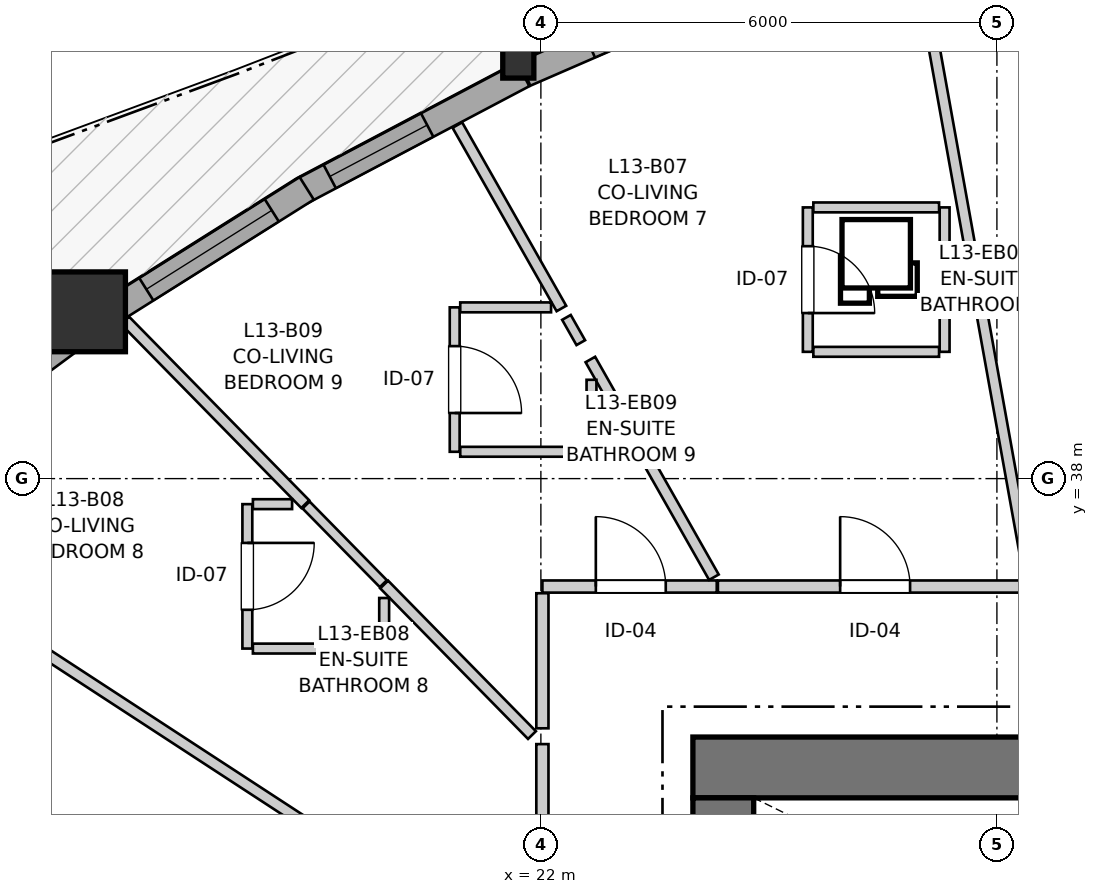
"""IFC4 building model, lengths in metres.
Left out: names, types, materials, properties, quantities, classifications, styles, units other than length and angle.
Written with IfcOpenShell. Run it as: python <this file> out.ifc"""

import sys

from ifc_helpers import new_model, si_unit, direction, frame, frame_2d, origin, origin_2d, place, context, subcontext, project, spatial, rectangle, i_section, extrude, source, transform, mapped, element, fill, save


model = new_model("IFC4")
c1 = context("Model", 3, precision=1e-05, world=origin(), true_north=direction((0.0, 1.0)))
c2 = subcontext(c1, "Body", "Model", "MODEL_VIEW")
j1 = project(units=[si_unit("LENGTHUNIT", "METRE"), si_unit("PLANEANGLEUNIT", "RADIAN")], contexts=[c1])
p1 = place(None, origin())
s1 = spatial("IfcSite", under=j1, at=p1, CompositionType="ELEMENT")
p2 = place(p1, origin())
s2 = spatial("IfcBuilding", under=s1, at=p2, CompositionType="ELEMENT")
p3 = place(p2, frame((0.0, 0.0, 46.2)))
s3 = spatial("IfcBuildingStorey", under=s2, at=p3, CompositionType="ELEMENT", Elevation=46.2)
p4 = place(p3, frame((36.7, 34.2, 0.0), z_axis=(0.0, 0.0, 1.0), x_axis=(-1.0, 0.0, 0.0)))
e1 = element("IfcWall", 1, at=p4, inside=s3, PredefinedType="SHEAR", context=c2, shape_type="SweptSolid", body=[
    extrude(rectangle(XDim=12.7, YDim=0.8, at=frame_2d((6.35, 0.0))), origin(), (0.0, 0.0, 1.0), 2.94),
])
p5 = place(p3, frame((24.4, 33.8, 0.0), z_axis=(0.0, 0.0, 1.0), x_axis=(0.0, -1.0, 0.0)))
e2 = element("IfcWall", 2, at=p5, inside=s3, PredefinedType="SHEAR", context=c2, shape_type="SweptSolid", body=[
    extrude(rectangle(XDim=15.6, YDim=0.8, at=frame_2d((7.8, 0.0))), origin(), (0.0, 0.0, 1.0), 2.94),
])
p6 = place(p5, frame((7.05, 0.0, 0.0)))
e3 = element("IfcOpeningElement", 3, at=p6, cuts=e2, PredefinedType="OPENING", context=c2, shape_type="SweptSolid", body=[
    extrude(rectangle(XDim=1.5, YDim=2.15, at=frame_2d((0.75, 1.075))), frame((0.0, 0.41, 0.0), z_axis=(0.0, -1.0, 0.0), x_axis=(1.0, 0.0, 0.0)), (0.0, 0.0, 1.0), 0.82),
])
p7 = place(p5, frame((3.52, 0.0, 0.0)))
e4 = element("IfcOpeningElement", 4, at=p7, cuts=e2, PredefinedType="OPENING", context=c2, shape_type="SweptSolid", body=[
    extrude(rectangle(XDim=0.86, YDim=2.05, at=frame_2d((0.43, 1.025))), frame((0.0, 0.41, 0.0), z_axis=(0.0, -1.0, 0.0), x_axis=(1.0, 0.0, 0.0)), (0.0, 0.0, 1.0), 0.82),
])
p8 = place(p5, frame((11.22, 0.0, 0.0)))
e5 = element("IfcOpeningElement", 5, at=p8, cuts=e2, PredefinedType="OPENING", context=c2, shape_type="SweptSolid", body=[
    extrude(rectangle(XDim=0.86, YDim=2.05, at=frame_2d((0.43, 1.025))), frame((0.0, 0.41, 0.0), z_axis=(0.0, -1.0, 0.0), x_axis=(1.0, 0.0, 0.0)), (0.0, 0.0, 1.0), 0.82),
])
m1 = source(origin(), c2, "Body", "SweptSolid", [
    extrude(i_section(OverallWidth=0.409, OverallDepth=0.425, WebThickness=0.03, FlangeThickness=0.048, FilletRadius=0.015, at=origin_2d()), origin(), (0.0, 0.0, 1.0), 2.94),
])
p9 = place(p3, frame((21.703, 43.482, 0.0), z_axis=(0.0, 0.0, 1.0), x_axis=(1.0, 0.0, 0.0)))
e6 = element("IfcColumn", 6, at=p9, inside=s3, PredefinedType="PILASTER", context=c2, shape_type="MappedRepresentation", body=[
    mapped(m1, transform((0.0, 0.0, 0.0), x_axis=(1.0, 0.0, 0.0), y_axis=(0.0, 1.0, 0.0), z_axis=(0.0, 0.0, 1.0), scale=1.0)),
])
m2 = source(origin(), c2, "Body", "SweptSolid", [
    extrude(rectangle(XDim=1.05, YDim=1.05, at=origin_2d()), origin(), (0.0, 0.0, 1.0), 2.94),
])
p10 = place(p3, frame((16.009, 40.194, 0.0), z_axis=(0.0, 0.0, 1.0), x_axis=(1.0, 0.0, 0.0)))
e7 = element("IfcColumn", 7, at=p10, inside=s3, PredefinedType="COLUMN", context=c2, shape_type="MappedRepresentation", body=[
    mapped(m2, transform((0.0, 0.0, 0.0), x_axis=(1.0, 0.0, 0.0), y_axis=(0.0, 1.0, 0.0), z_axis=(0.0, 0.0, 1.0), scale=1.0)),
])
p11 = place(p3, frame((24.842, 44.656, 0.0), z_axis=(0.0, 0.0, 1.0), x_axis=(-0.917071223009, -0.398723427866, 0.0)))
e8 = element("IfcWall", 8, at=p11, inside=s3, PredefinedType="SOLIDWALL", context=c2, shape_type="SweptSolid", body=[
    extrude(rectangle(XDim=3.327, YDim=0.35, at=frame_2d((1.663, 0.0))), origin(), (0.0, 0.0, 1.0), 2.42),
])
p12 = place(p11, frame((0.948, 0.0, 0.82)))
e9 = element("IfcOpeningElement", 9, at=p12, cuts=e8, PredefinedType="OPENING", context=c2, shape_type="SweptSolid", body=[
    extrude(rectangle(XDim=1.45, YDim=1.25, at=frame_2d((0.725, 0.625))), frame((0.0, 0.185, 0.0), z_axis=(0.0, -1.0, 0.0), x_axis=(1.0, 0.0, 0.0)), (0.0, 0.0, 1.0), 0.37),
])
p13 = place(p3, frame((21.767, 43.318, 0.0), z_axis=(0.0, 0.0, 1.0), x_axis=(-0.884379674805, -0.466768240984, 0.0)))
e10 = element("IfcWall", 10, at=p13, inside=s3, PredefinedType="SOLIDWALL", context=c2, shape_type="SweptSolid", body=[
    extrude(rectangle(XDim=3.308, YDim=0.35, at=frame_2d((1.654, 0.0))), origin(), (0.0, 0.0, 1.0), 2.42),
])
p14 = place(p13, frame((1.428, 0.0, 0.82)))
e11 = element("IfcOpeningElement", 11, at=p14, cuts=e10, PredefinedType="OPENING", context=c2, shape_type="SweptSolid", body=[
    extrude(rectangle(XDim=1.45, YDim=1.25, at=frame_2d((0.725, 0.625))), frame((0.0, 0.185, 0.0), z_axis=(0.0, -1.0, 0.0), x_axis=(1.0, 0.0, 0.0)), (0.0, 0.0, 1.0), 0.37),
])
p15 = place(p3, frame((18.919, 41.818, 0.0), z_axis=(0.0, 0.0, 1.0), x_axis=(-0.846409172462, -0.532533109555, 0.0)))
e12 = element("IfcWall", 12, at=p15, inside=s3, PredefinedType="SOLIDWALL", context=c2, shape_type="SweptSolid", body=[
    extrude(rectangle(XDim=3.028, YDim=0.35, at=frame_2d((1.514, 0.0))), origin(), (0.0, 0.0, 1.0), 2.42),
])
p16 = place(p15, frame((0.543, 0.0, 0.82)))
e13 = element("IfcOpeningElement", 13, at=p16, cuts=e12, PredefinedType="OPENING", context=c2, shape_type="SweptSolid", body=[
    extrude(rectangle(XDim=1.95, YDim=1.4, at=frame_2d((0.975, 0.7))), frame((0.0, 0.185, 0.0), z_axis=(0.0, -1.0, 0.0), x_axis=(1.0, 0.0, 0.0)), (0.0, 0.0, 1.0), 0.37),
])
p17 = place(p3, frame((15.872, 39.875, 0.0), z_axis=(0.0, 0.0, 1.0), x_axis=(-0.803801282622, -0.594897888763, 0.0)))
e14 = element("IfcWall", 14, at=p17, inside=s3, PredefinedType="SOLIDWALL", context=c2, shape_type="SweptSolid", body=[
    extrude(rectangle(XDim=3.047, YDim=0.35, at=frame_2d((1.523, 0.0))), origin(), (0.0, 0.0, 1.0), 2.42),
])
p18 = place(p17, frame((0.719, 0.0, 0.82)))
e15 = element("IfcOpeningElement", 15, at=p18, cuts=e14, PredefinedType="OPENING", context=c2, shape_type="SweptSolid", body=[
    extrude(rectangle(XDim=1.6, YDim=1.35, at=frame_2d((0.8, 0.675))), frame((0.0, 0.185, 0.0), z_axis=(0.0, -1.0, 0.0), x_axis=(1.0, 0.0, 0.0)), (0.0, 0.0, 1.0), 0.37),
])
p19 = place(p3, frame((24.329, 36.58, 0.0), z_axis=(0.0, 0.0, 1.0), x_axis=(1.0, 0.0, 0.0)))
e16 = element("IfcWall", 16, at=p19, inside=s3, PredefinedType="PARTITIONING", context=c2, shape_type="SweptSolid", body=[
    extrude(rectangle(XDim=4.089, YDim=0.16, at=frame_2d((2.044, 0.0))), origin(), (0.0, 0.0, 1.0), 2.548),
])
p20 = place(p19, frame((1.608, 0.0, 0.0)))
e17 = element("IfcOpeningElement", 17, at=p20, cuts=e16, PredefinedType="OPENING", context=c2, shape_type="SweptSolid", body=[
    extrude(rectangle(XDim=0.92, YDim=2.1, at=frame_2d((0.46, 1.05))), frame((0.0, 0.09, 0.0), z_axis=(0.0, -1.0, 0.0), x_axis=(1.0, 0.0, 0.0)), (0.0, 0.0, 1.0), 0.18),
])
p21 = place(p3, frame((22.02, 31.467, 0.0), z_axis=(0.0, 0.0, 1.0), x_axis=(0.0, 1.0, 0.0)))
e18 = element("IfcWall", 18, at=p21, inside=s3, PredefinedType="PARTITIONING", context=c2, shape_type="SweptSolid", body=[
    extrude(rectangle(XDim=3.04, YDim=0.16, at=frame_2d((1.52, 0.0))), origin(), (0.0, 0.0, 1.0), 2.94),
])
p22 = place(p21, frame((1.033, 0.0, 0.0)))
e19 = element("IfcOpeningElement", 19, at=p22, cuts=e18, PredefinedType="OPENING", context=c2, shape_type="SweptSolid", body=[
    extrude(rectangle(XDim=0.92, YDim=2.1, at=frame_2d((0.46, 1.05))), frame((0.0, 0.09, 0.0), z_axis=(0.0, -1.0, 0.0), x_axis=(1.0, 0.0, 0.0)), (0.0, 0.0, 1.0), 0.18),
])
p23 = place(p3, frame((22.02, 36.58, 0.0), z_axis=(0.0, 0.0, 1.0), x_axis=(1.0, 0.0, 0.0)))
e20 = element("IfcWall", 20, at=p23, inside=s3, PredefinedType="PARTITIONING", context=c2, shape_type="SweptSolid", body=[
    extrude(rectangle(XDim=2.294, YDim=0.16, at=frame_2d((1.147, 0.0))), origin(), (0.0, 0.0, 1.0), 2.548),
])
p24 = place(p23, frame((0.703, 0.0, 0.0)))
e21 = element("IfcOpeningElement", 21, at=p24, cuts=e20, PredefinedType="OPENING", context=c2, shape_type="SweptSolid", body=[
    extrude(rectangle(XDim=0.92, YDim=2.1, at=frame_2d((0.46, 1.05))), frame((0.0, 0.09, 0.0), z_axis=(0.0, -1.0, 0.0), x_axis=(1.0, 0.0, 0.0)), (0.0, 0.0, 1.0), 0.18),
])
p25 = place(p3, frame((25.512, 41.568, 0.0), z_axis=(0.0, 0.0, 1.0), x_axis=(0.0, -1.0, 0.0)))
e22 = element("IfcWall", 22, at=p25, inside=s3, PredefinedType="PARTITIONING", context=c2, shape_type="SweptSolid", body=[
    extrude(rectangle(XDim=1.9, YDim=0.13, at=frame_2d((0.95, 0.0))), origin(), (0.0, 0.0, 1.0), 2.94),
])
p26 = place(p25, frame((0.51, 0.0, 0.0)))
e23 = element("IfcOpeningElement", 23, at=p26, cuts=e22, PredefinedType="OPENING", context=c2, shape_type="SweptSolid", body=[
    extrude(rectangle(XDim=0.88, YDim=2.05, at=frame_2d((0.44, 1.025))), frame((0.0, 0.075, 0.0), z_axis=(0.0, -1.0, 0.0), x_axis=(1.0, 0.0, 0.0)), (0.0, 0.0, 1.0), 0.15),
])
p27 = place(p3, frame((18.138, 37.664, 0.0), z_axis=(0.0, 0.0, 1.0), x_axis=(0.0, -1.0, 0.0)))
e24 = element("IfcWall", 24, at=p27, inside=s3, PredefinedType="PARTITIONING", context=c2, shape_type="SweptSolid", body=[
    extrude(rectangle(XDim=1.9, YDim=0.13, at=frame_2d((0.95, 0.0))), origin(), (0.0, 0.0, 1.0), 2.94),
])
p28 = place(p27, frame((0.51, 0.0, 0.0)))
e25 = element("IfcOpeningElement", 25, at=p28, cuts=e24, PredefinedType="OPENING", context=c2, shape_type="SweptSolid", body=[
    extrude(rectangle(XDim=0.88, YDim=2.05, at=frame_2d((0.44, 1.025))), frame((0.0, 0.075, 0.0), z_axis=(0.0, -1.0, 0.0), x_axis=(1.0, 0.0, 0.0)), (0.0, 0.0, 1.0), 0.15),
])
p29 = place(p3, frame((20.866, 40.253, 0.0), z_axis=(0.0, 0.0, 1.0), x_axis=(0.0, -1.0, 0.0)))
e26 = element("IfcWall", 26, at=p29, inside=s3, PredefinedType="PARTITIONING", context=c2, shape_type="SweptSolid", body=[
    extrude(rectangle(XDim=1.9, YDim=0.13, at=frame_2d((0.95, 0.0))), origin(), (0.0, 0.0, 1.0), 2.94),
])
p30 = place(p29, frame((0.51, 0.0, 0.0)))
e27 = element("IfcOpeningElement", 27, at=p30, cuts=e26, PredefinedType="OPENING", context=c2, shape_type="SweptSolid", body=[
    extrude(rectangle(XDim=0.88, YDim=2.05, at=frame_2d((0.44, 1.025))), frame((0.0, 0.075, 0.0), z_axis=(0.0, -1.0, 0.0), x_axis=(1.0, 0.0, 0.0)), (0.0, 0.0, 1.0), 0.15),
])
p31 = place(p3, frame((12.929, 37.365, 0.0), z_axis=(0.0, 0.0, 1.0), x_axis=(0.83754252852, -0.54637213776, 0.0)))
e28 = element("IfcWall", 28, at=p31, inside=s3, PredefinedType="PARTITIONING", context=c2, shape_type="SweptSolid", body=[
    extrude(rectangle(XDim=10.704, YDim=0.145, at=frame_2d((5.352, 0.0))), origin(), (0.0, 0.0, 1.0), 2.94),
])
p32 = place(p3, frame((26.905, 45.167, 0.0), z_axis=(0.0, 0.0, 1.0), x_axis=(0.176948932403, -0.984220033997, 0.0)))
e29 = element("IfcWall", 29, at=p32, inside=s3, PredefinedType="PARTITIONING", context=c2, shape_type="SweptSolid", body=[
    extrude(rectangle(XDim=8.622, YDim=0.145, at=frame_2d((4.311, 0.0))), origin(), (0.0, 0.0, 1.0), 2.94),
])
p33 = place(p3, frame((22.651, 39.567, 0.0), z_axis=(0.0, 0.0, 1.0), x_axis=(0.493566118786, -0.8697082766, 0.0)))
e30 = element("IfcWall", 30, at=p33, inside=s3, PredefinedType="PARTITIONING", context=c2, shape_type="SweptSolid", body=[
    extrude(rectangle(XDim=3.293, YDim=0.145, at=frame_2d((1.647, 0.0))), origin(), (0.0, 0.0, 1.0), 2.94),
])
p34 = place(p3, frame((16.529, 40.081, 0.0), z_axis=(0.0, 0.0, 1.0), x_axis=(0.700331657038, -0.713817602859, 0.0)))
e31 = element("IfcWall", 31, at=p34, inside=s3, PredefinedType="PARTITIONING", context=c2, shape_type="SweptSolid", body=[
    extrude(rectangle(XDim=3.385, YDim=0.145, at=frame_2d((1.693, 0.0))), origin(), (0.0, 0.0, 1.0), 2.308),
])
p35 = place(p3, frame((19.938, 36.607, 0.0), z_axis=(0.0, 0.0, 1.0), x_axis=(0.700568911338, -0.713584753527, 0.0)))
e32 = element("IfcWall", 32, at=p35, inside=s3, PredefinedType="PARTITIONING", context=c2, shape_type="SweptSolid", body=[
    extrude(rectangle(XDim=2.776, YDim=0.145, at=frame_2d((1.388, 0.0))), origin(), (0.0, 0.0, 1.0), 2.308),
])
p36 = place(p3, frame((20.901, 42.651, 0.0), z_axis=(0.0, 0.0, 1.0), x_axis=(0.4934166236, -0.86979309928, 0.0)))
e33 = element("IfcWall", 33, at=p36, inside=s3, PredefinedType="PARTITIONING", context=c2, shape_type="SweptSolid", body=[
    extrude(rectangle(XDim=2.774, YDim=0.145, at=frame_2d((1.387, 0.0))), origin(), (0.0, 0.0, 1.0), 2.94),
])
p37 = place(p3, frame((22.02, 34.715, 0.0), z_axis=(0.0, 0.0, 1.0), x_axis=(0.0, 1.0, 0.0)))
e34 = element("IfcWall", 34, at=p37, inside=s3, PredefinedType="PARTITIONING", context=c2, shape_type="SweptSolid", body=[
    extrude(rectangle(XDim=1.777, YDim=0.16, at=frame_2d((0.888, 0.0))), origin(), (0.0, 0.0, 1.0), 2.94),
])
p38 = place(p3, frame((27.312, 39.668, 0.0), z_axis=(0.0, 0.0, 1.0), x_axis=(0.0, 1.0, 0.0)))
e35 = element("IfcWall", 35, at=p38, inside=s3, PredefinedType="PARTITIONING", context=c2, shape_type="SweptSolid", body=[
    extrude(rectangle(XDim=1.9, YDim=0.13, at=frame_2d((0.95, 0.0))), origin(), (0.0, 0.0, 1.0), 2.94),
])
p39 = place(p3, frame((25.585, 41.568, 0.0), z_axis=(0.0, 0.0, 1.0), x_axis=(1.0, 0.0, 0.0)))
e36 = element("IfcWall", 36, at=p39, inside=s3, PredefinedType="PARTITIONING", context=c2, shape_type="SweptSolid", body=[
    extrude(rectangle(XDim=1.654, YDim=0.13, at=frame_2d((0.827, 0.0))), origin(), (0.0, 0.0, 1.0), 2.508),
])
p40 = place(p3, frame((25.585, 39.668, 0.0), z_axis=(0.0, 0.0, 1.0), x_axis=(1.0, 0.0, 0.0)))
e37 = element("IfcWall", 37, at=p40, inside=s3, PredefinedType="PARTITIONING", context=c2, shape_type="SweptSolid", body=[
    extrude(rectangle(XDim=1.654, YDim=0.13, at=frame_2d((0.827, 0.0))), origin(), (0.0, 0.0, 1.0), 2.94),
])
for number, where, z_axis, x_axis in (
    (38, (20.939, 38.353, 0.0), (0.0, 0.0, 1.0), (1.0, 0.0, 0.0)),
    (39, (18.211, 35.764, 0.0), (0.0, 0.0, 1.0), (1.0, 0.0, 0.0)),
):
    element("IfcWall", number, at=place(p3, frame(where, z_axis=z_axis, x_axis=x_axis)), inside=s3, PredefinedType="PARTITIONING", context=c2, shape_type="SweptSolid", body=[
        extrude(rectangle(XDim=1.727, YDim=0.13, at=frame_2d((0.864, 0.0))), origin(), (0.0, 0.0, 1.0), 2.94),
    ])
p41 = place(p3, frame((18.91, 37.653, 0.0), z_axis=(0.0, 0.0, 1.0), x_axis=(0.700686611827, -0.713469180838, 0.0)))
e40 = element("IfcWall", 40, at=p41, inside=s3, PredefinedType="PARTITIONING", context=c2, shape_type="SweptSolid", body=[
    extrude(rectangle(XDim=1.452, YDim=0.13, at=frame_2d((0.726, 0.0))), origin(), (0.0, 0.0, 1.0), 2.308),
])
p42 = place(p3, frame((20.939, 40.253, 0.0), z_axis=(0.0, 0.0, 1.0), x_axis=(1.0, 0.0, 0.0)))
e41 = element("IfcWall", 41, at=p42, inside=s3, PredefinedType="PARTITIONING", context=c2, shape_type="SweptSolid", body=[
    extrude(rectangle(XDim=1.195, YDim=0.13, at=frame_2d((0.597, 0.0))), origin(), (0.0, 0.0, 1.0), 2.94),
])
p43 = place(p3, frame((22.666, 38.426, 0.0), z_axis=(0.0, 0.0, 1.0), x_axis=(0.0, 1.0, 0.0)))
e42 = element("IfcWall", 42, at=p43, inside=s3, PredefinedType="PARTITIONING", context=c2, shape_type="SweptSolid", body=[
    extrude(rectangle(XDim=0.874, YDim=0.13, at=frame_2d((0.437, 0.0))), origin(), (0.0, 0.0, 1.0), 2.94),
])
p44 = place(p3, frame((19.938, 35.837, 0.0), z_axis=(0.0, 0.0, 1.0), x_axis=(0.0, 1.0, 0.0)))
e43 = element("IfcWall", 43, at=p44, inside=s3, PredefinedType="PARTITIONING", context=c2, shape_type="SweptSolid", body=[
    extrude(rectangle(XDim=0.592, YDim=0.13, at=frame_2d((0.296, 0.0))), origin(), (0.0, 0.0, 1.0), 2.94),
])
p45 = place(p3, frame((18.211, 37.664, 0.0), z_axis=(0.0, 0.0, 1.0), x_axis=(1.0, 0.0, 0.0)))
e44 = element("IfcWall", 44, at=p45, inside=s3, PredefinedType="PARTITIONING", context=c2, shape_type="SweptSolid", body=[
    extrude(rectangle(XDim=0.516, YDim=0.13, at=frame_2d((0.258, 0.0))), origin(), (0.0, 0.0, 1.0), 2.508),
])
p46 = place(p3, frame((22.336, 40.121, 0.0), z_axis=(0.0, 0.0, 1.0), x_axis=(0.493383408092, -0.86981194095, 0.0)))
e45 = element("IfcWall", 45, at=p46, inside=s3, PredefinedType="PARTITIONING", context=c2, shape_type="SweptSolid", body=[
    extrude(rectangle(XDim=0.382, YDim=0.13, at=frame_2d((0.191, 0.0))), origin(), (0.0, 0.0, 1.0), 2.94),
])
m3 = source(origin(), c2, "Body", "SweptSolid", [
    extrude(rectangle(XDim=1.45, YDim=1.25, at=frame_2d((0.725, 0.625))), frame((0.0, 0.03, 0.0), z_axis=(0.0, -1.0, 0.0), x_axis=(1.0, 0.0, 0.0)), (0.0, 0.0, 1.0), 0.06),
])
p47 = place(p14, origin())
e46 = element("IfcWindow", 46, at=p47, inside=s3, PartitioningType="SINGLE_PANEL", PredefinedType="WINDOW", context=c2, shape_type="MappedRepresentation", body=[
    mapped(m3, transform((0.0, 0.0, 0.0), x_axis=(1.0, 0.0, 0.0), y_axis=(0.0, 1.0, 0.0), z_axis=(0.0, 0.0, 1.0), scale=1.0)),
])
fill(e11, e46)
m4 = source(origin(), c2, "Body", "SweptSolid", [
    extrude(rectangle(XDim=1.95, YDim=1.4, at=frame_2d((0.975, 0.7))), frame((0.0, 0.03, 0.0), z_axis=(0.0, -1.0, 0.0), x_axis=(1.0, 0.0, 0.0)), (0.0, 0.0, 1.0), 0.06),
])
p48 = place(p16, origin())
e47 = element("IfcWindow", 47, at=p48, inside=s3, PartitioningType="SINGLE_PANEL", PredefinedType="WINDOW", context=c2, shape_type="MappedRepresentation", body=[
    mapped(m4, transform((0.0, 0.0, 0.0), x_axis=(1.0, 0.0, 0.0), y_axis=(0.0, 1.0, 0.0), z_axis=(0.0, 0.0, 1.0), scale=1.0)),
])
fill(e13, e47)
m5 = source(origin(), c2, "Body", "SweptSolid", [
    extrude(rectangle(XDim=0.92, YDim=2.1, at=frame_2d((0.46, 1.05))), frame((0.0, 0.025, 0.0), z_axis=(0.0, -1.0, 0.0), x_axis=(1.0, 0.0, 0.0)), (0.0, 0.0, 1.0), 0.05),
])
p49 = place(p20, origin())
e48 = element("IfcDoor", 48, at=p49, inside=s3, OperationType="SINGLE_SWING_LEFT", PredefinedType="DOOR", context=c2, shape_type="MappedRepresentation", body=[
    mapped(m5, transform((0.0, 0.0, 0.0), x_axis=(1.0, 0.0, 0.0), y_axis=(0.0, 1.0, 0.0), z_axis=(0.0, 0.0, 1.0), scale=1.0)),
])
fill(e17, e48)
p50 = place(p24, origin())
e49 = element("IfcDoor", 49, at=p50, inside=s3, OperationType="SINGLE_SWING_LEFT", PredefinedType="DOOR", context=c2, shape_type="MappedRepresentation", body=[
    mapped(m5, transform((0.0, 0.0, 0.0), x_axis=(1.0, 0.0, 0.0), y_axis=(0.0, 1.0, 0.0), z_axis=(0.0, 0.0, 1.0), scale=1.0)),
])
fill(e21, e49)
m6 = source(origin(), c2, "Body", "SweptSolid", [
    extrude(rectangle(XDim=0.88, YDim=2.05, at=frame_2d((0.44, 1.025))), frame((0.0, 0.025, 0.0), z_axis=(0.0, -1.0, 0.0), x_axis=(1.0, 0.0, 0.0)), (0.0, 0.0, 1.0), 0.05),
])
p51 = place(p26, origin())
e50 = element("IfcDoor", 50, at=p51, inside=s3, OperationType="SINGLE_SWING_RIGHT", PredefinedType="DOOR", context=c2, shape_type="MappedRepresentation", body=[
    mapped(m6, transform((0.0, 0.0, 0.0), x_axis=(1.0, 0.0, 0.0), y_axis=(0.0, 1.0, 0.0), z_axis=(0.0, 0.0, 1.0), scale=1.0)),
])
fill(e23, e50)
p52 = place(p28, origin())
e51 = element("IfcDoor", 51, at=p52, inside=s3, OperationType="SINGLE_SWING_LEFT", PredefinedType="DOOR", context=c2, shape_type="MappedRepresentation", body=[
    mapped(m6, transform((0.0, 0.0, 0.0), x_axis=(1.0, 0.0, 0.0), y_axis=(0.0, 1.0, 0.0), z_axis=(0.0, 0.0, 1.0), scale=1.0)),
])
fill(e25, e51)
p53 = place(p30, origin())
e52 = element("IfcDoor", 52, at=p53, inside=s3, OperationType="SINGLE_SWING_RIGHT", PredefinedType="DOOR", context=c2, shape_type="MappedRepresentation", body=[
    mapped(m6, transform((0.0, 0.0, 0.0), x_axis=(1.0, 0.0, 0.0), y_axis=(0.0, 1.0, 0.0), z_axis=(0.0, 0.0, 1.0), scale=1.0)),
])
fill(e27, e52)
save(model, sys.argv[1])
